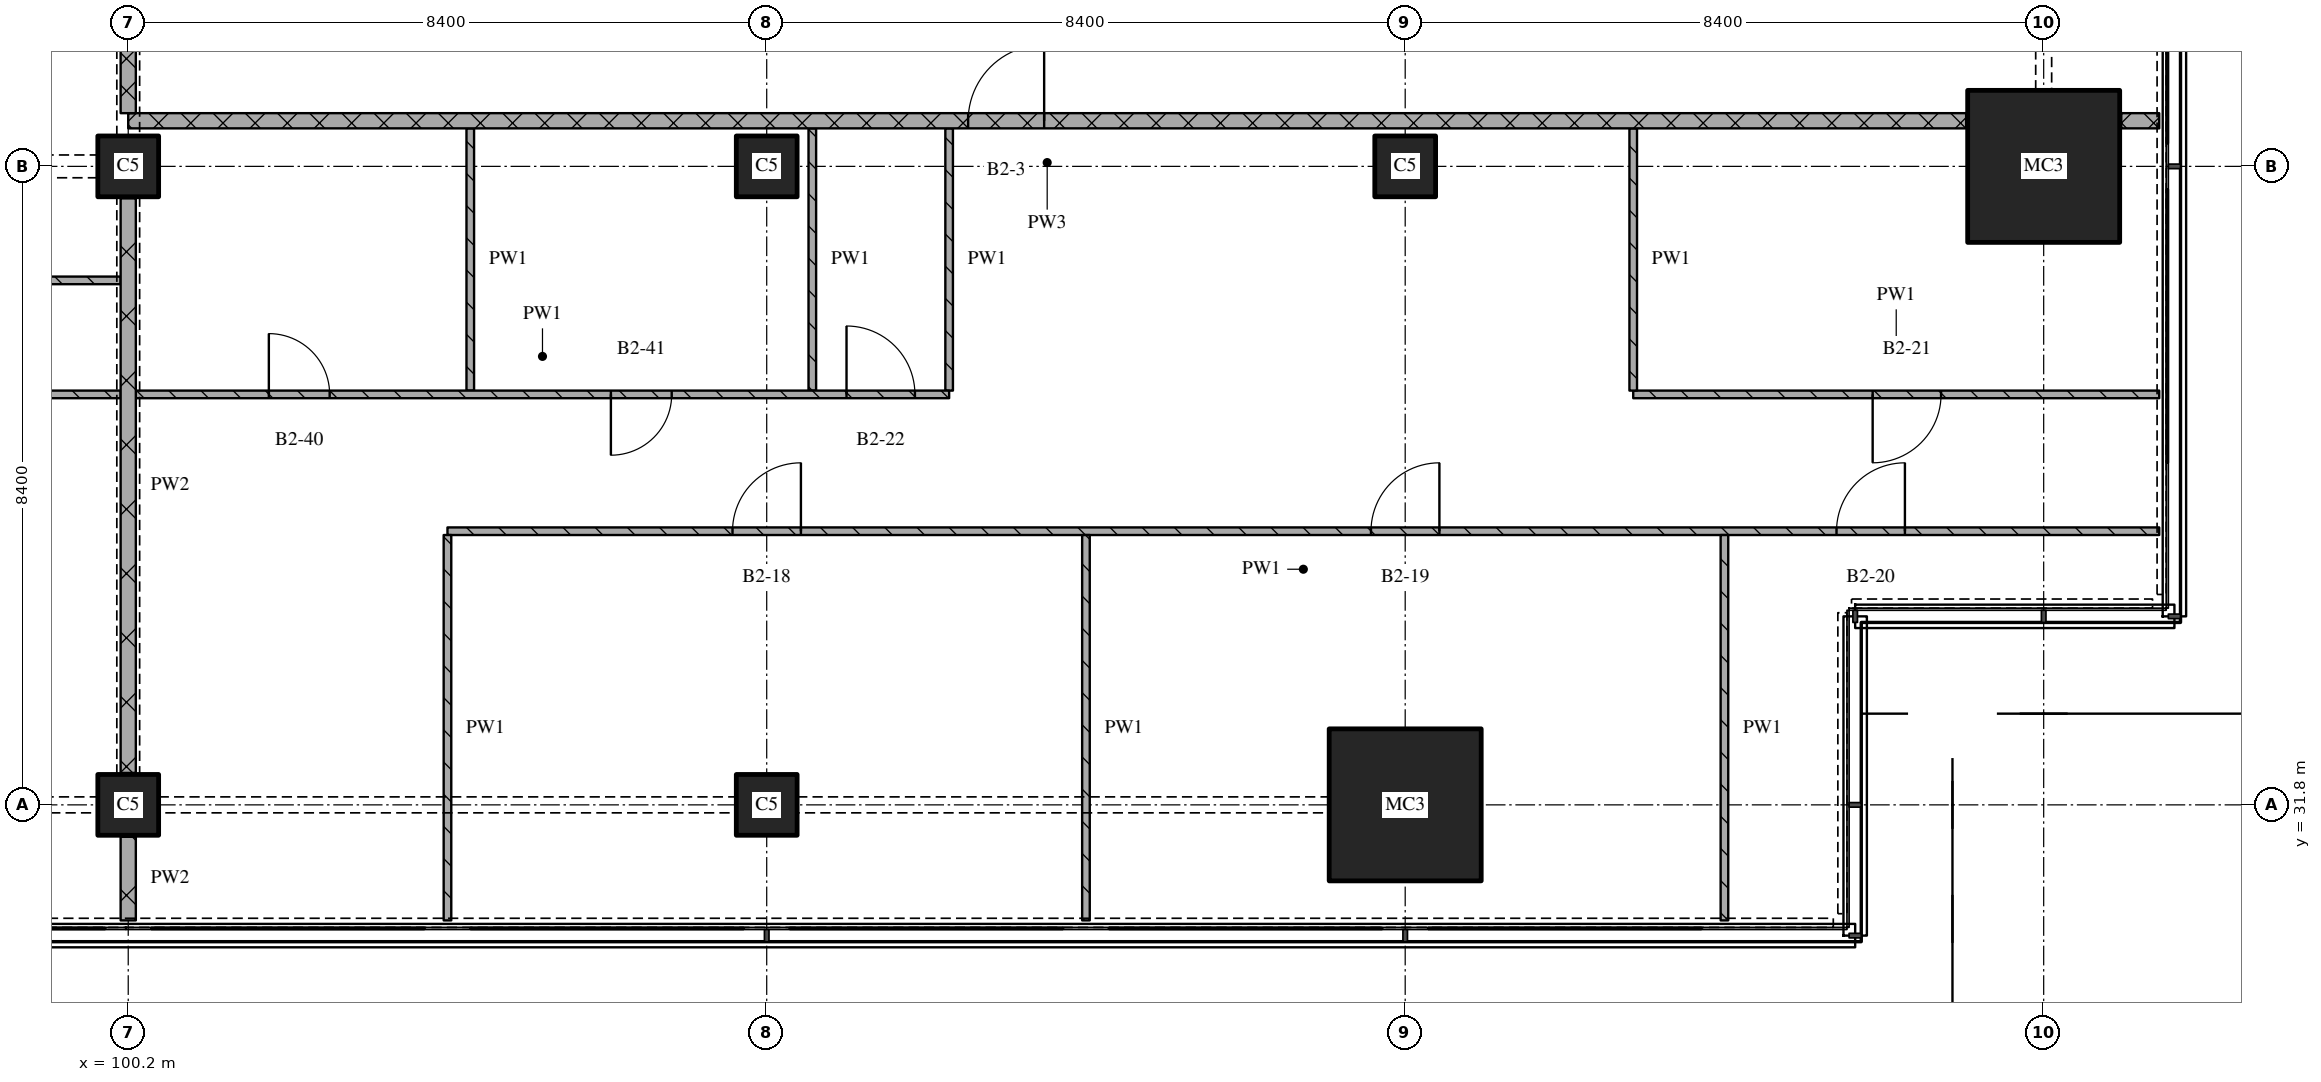
"""IFC4 building model, lengths in metres.
Left out: names, types, materials, properties, quantities, classifications, styles, units other than length and angle.
Written with IfcOpenShell. Run it as: python <this file> out.ifc"""

import sys

from ifc_helpers import new_model, si_unit, direction, frame, frame_2d, origin, origin_2d, place, context, subcontext, project, spatial, rectangle, extrude, element, fill, save


model = new_model("IFC4")
c1 = context("Model", 3, precision=1e-05, world=origin(), true_north=direction((0.0, 1.0)))
c2 = subcontext(c1, "Body", "Model", "MODEL_VIEW")
j1 = project(units=[si_unit("LENGTHUNIT", "METRE"), si_unit("PLANEANGLEUNIT", "RADIAN")], contexts=[c1])
p1 = place(None, origin())
s1 = spatial("IfcSite", under=j1, at=p1, CompositionType="ELEMENT")
p2 = place(p1, origin())
s2 = spatial("IfcBuilding", under=s1, at=p2, CompositionType="ELEMENT")
p3 = place(p2, frame((0.0, 0.0, 106.05)))
s3 = spatial("IfcBuildingStorey", under=s2, at=p3, CompositionType="ELEMENT", Elevation=106.05)
for number, where, z_axis, x_axis in (
    (1, (100.2, 31.8, 0.0), (0.0, 0.0, 1.0), (1.0, 0.0, 0.0)),
    (2, (100.2, 40.2, 0.0), (0.0, 0.0, 1.0), (1.0, 0.0, 0.0)),
    (3, (108.6, 31.8, 0.0), (0.0, 0.0, 1.0), (1.0, 0.0, 0.0)),
    (4, (108.6, 40.2, 0.0), (0.0, 0.0, 1.0), (1.0, 0.0, 0.0)),
):
    element("IfcColumn", number, at=place(p3, frame(where, z_axis=z_axis, x_axis=x_axis)), inside=s3, PredefinedType="COLUMN", context=c2, shape_type="SweptSolid", body=[
        extrude(rectangle(XDim=0.8, YDim=0.8, at=origin_2d()), origin(), (0.0, 0.0, 1.0), 3.6),
    ])
p4 = place(p3, frame((117.0, 31.8, 0.0), z_axis=(0.0, 0.0, 1.0), x_axis=(1.0, 0.0, 0.0)))
e5 = element("IfcColumn", 5, at=p4, inside=s3, PredefinedType="COLUMN", context=c2, shape_type="SweptSolid", body=[
    extrude(rectangle(XDim=2.0, YDim=2.0, at=origin_2d()), origin(), (0.0, 0.0, 1.0), 3.6),
])
p5 = place(p3, frame((117.0, 40.2, 0.0), z_axis=(0.0, 0.0, 1.0), x_axis=(1.0, 0.0, 0.0)))
e6 = element("IfcColumn", 6, at=p5, inside=s3, PredefinedType="COLUMN", context=c2, shape_type="SweptSolid", body=[
    extrude(rectangle(XDim=0.8, YDim=0.8, at=origin_2d()), origin(), (0.0, 0.0, 1.0), 3.6),
])
p6 = place(p3, frame((125.4, 40.2, 0.0), z_axis=(0.0, 0.0, 1.0), x_axis=(1.0, 0.0, 0.0)))
e7 = element("IfcColumn", 7, at=p6, inside=s3, PredefinedType="COLUMN", context=c2, shape_type="SweptSolid", body=[
    extrude(rectangle(XDim=2.0, YDim=2.0, at=origin_2d()), origin(), (0.0, 0.0, 1.0), 3.6),
])
p7 = place(p3, frame((126.92, 35.4, 0.0), z_axis=(0.0, 0.0, 1.0), x_axis=(-1.0, 0.0, 0.0)))
e8 = element("IfcWall", 8, at=p7, inside=s3, PredefinedType="PARTITIONING", context=c2, shape_type="SweptSolid", body=[
    extrude(rectangle(XDim=22.52, YDim=0.1, at=frame_2d((11.26, 0.0))), origin(), (0.0, 0.0, 1.0), 3.32),
])
p8 = place(p7, frame((3.346, 0.0, 0.0)))
e9 = element("IfcOpeningElement", 9, at=p8, cuts=e8, PredefinedType="OPENING", context=c2, shape_type="SweptSolid", body=[
    extrude(rectangle(XDim=0.9, YDim=2.1, at=frame_2d((0.45, 1.05))), frame((0.0, 0.06, 0.0), z_axis=(0.0, -1.0, 0.0), x_axis=(1.0, 0.0, 0.0)), (0.0, 0.0, 1.0), 0.12),
])
p9 = place(p7, frame((9.47, 0.0, 0.0)))
e10 = element("IfcOpeningElement", 10, at=p9, cuts=e8, PredefinedType="OPENING", context=c2, shape_type="SweptSolid", body=[
    extrude(rectangle(XDim=0.9, YDim=2.1, at=frame_2d((0.45, 1.05))), frame((0.0, 0.06, 0.0), z_axis=(0.0, -1.0, 0.0), x_axis=(1.0, 0.0, 0.0)), (0.0, 0.0, 1.0), 0.12),
])
p10 = place(p7, frame((17.87, 0.0, 0.0)))
e11 = element("IfcOpeningElement", 11, at=p10, cuts=e8, PredefinedType="OPENING", context=c2, shape_type="SweptSolid", body=[
    extrude(rectangle(XDim=0.9, YDim=2.1, at=frame_2d((0.45, 1.05))), frame((0.0, 0.06, 0.0), z_axis=(0.0, -1.0, 0.0), x_axis=(1.0, 0.0, 0.0)), (0.0, 0.0, 1.0), 0.12),
])
p11 = place(p3, frame((120.0, 37.2, 0.0), z_axis=(0.0, 0.0, 1.0), x_axis=(1.0, 0.0, 0.0)))
e12 = element("IfcWall", 12, at=p11, inside=s3, PredefinedType="PARTITIONING", context=c2, shape_type="SweptSolid", body=[
    extrude(rectangle(XDim=6.92, YDim=0.1, at=frame_2d((3.46, 0.0))), origin(), (0.0, 0.0, 1.0), 3.32),
])
p12 = place(p11, frame((3.15, 0.0, 0.0)))
e13 = element("IfcOpeningElement", 13, at=p12, cuts=e12, PredefinedType="OPENING", context=c2, shape_type="SweptSolid", body=[
    extrude(rectangle(XDim=0.9, YDim=2.1, at=frame_2d((0.45, 1.05))), frame((0.0, 0.06, 0.0), z_axis=(0.0, -1.0, 0.0), x_axis=(1.0, 0.0, 0.0)), (0.0, 0.0, 1.0), 0.12),
])
p13 = place(p3, frame((95.1, 38.7, 0.0), z_axis=(0.0, 0.0, 1.0), x_axis=(1.0, 0.0, 0.0)))
e14 = element("IfcWall", 14, at=p13, inside=s3, PredefinedType="PARTITIONING", context=c2, shape_type="SweptSolid", body=[
    extrude(rectangle(XDim=5.0, YDim=0.1, at=frame_2d((2.5, 0.0))), origin(), (0.0, 0.0, 1.0), 3.32),
])
p14 = place(p13, frame((2.1, 0.0, 0.0)))
e15 = element("IfcOpeningElement", 15, at=p14, cuts=e14, PredefinedType="OPENING", context=c2, shape_type="SweptSolid", body=[
    extrude(rectangle(XDim=0.9, YDim=2.1, at=frame_2d((0.45, 1.05))), frame((0.0, 0.06, 0.0), z_axis=(0.0, -1.0, 0.0), x_axis=(1.0, 0.0, 0.0)), (0.0, 0.0, 1.0), 0.12),
])
p15 = place(p3, frame((124.38, 40.8, 0.0), z_axis=(0.0, 0.0, 1.0), x_axis=(-1.0, 0.0, 0.0)))
e16 = element("IfcWall", 16, at=p15, inside=s3, PredefinedType="PARTITIONING", context=c2, shape_type="SweptSolid", body=[
    extrude(rectangle(XDim=24.18, YDim=0.2, at=frame_2d((12.09, 0.0))), origin(), (0.0, 0.0, 1.0), 3.32),
])
p16 = place(p15, frame((12.13, 0.0, 0.0)))
e17 = element("IfcOpeningElement", 17, at=p16, cuts=e16, PredefinedType="OPENING", context=c2, shape_type="SweptSolid", body=[
    extrude(rectangle(XDim=1.0, YDim=2.1, at=frame_2d((0.5, 1.05))), frame((0.0, 0.11, 0.0), z_axis=(0.0, -1.0, 0.0), x_axis=(1.0, 0.0, 0.0)), (0.0, 0.0, 1.0), 0.22),
])
p17 = place(p3, frame((126.42, 40.8, 0.0), z_axis=(0.0, 0.0, 1.0), x_axis=(1.0, 0.0, 0.0)))
e18 = element("IfcWall", 18, at=p17, inside=s3, PredefinedType="PARTITIONING", context=c2, shape_type="SweptSolid", body=[
    extrude(rectangle(XDim=0.5, YDim=0.2, at=frame_2d((0.25, 0.0))), origin(), (0.0, 0.0, 1.0), 3.32),
])
p18 = place(p3, frame((100.2, 43.1, 0.0), z_axis=(0.0, 0.0, 1.0), x_axis=(0.0, -1.0, 0.0)))
e19 = element("IfcWall", 19, at=p18, inside=s3, PredefinedType="PARTITIONING", context=c2, shape_type="SweptSolid", body=[
    extrude(rectangle(XDim=2.2, YDim=0.2, at=frame_2d((1.1, 0.0))), origin(), (0.0, 0.0, 1.0), 2.43),
])
p19 = place(p3, frame((100.2, 31.38, 0.0), z_axis=(0.0, 0.0, 1.0), x_axis=(0.0, -1.0, 0.0)))
e20 = element("IfcWall", 20, at=p19, inside=s3, PredefinedType="PARTITIONING", context=c2, shape_type="SweptSolid", body=[
    extrude(rectangle(XDim=1.1, YDim=0.2, at=frame_2d((0.55, 0.0))), origin(), (0.0, 0.0, 1.0), 3.32),
])
p20 = place(p3, frame((100.2, 39.78, 0.0), z_axis=(0.0, 0.0, 1.0), x_axis=(0.0, -1.0, 0.0)))
e21 = element("IfcWall", 21, at=p20, inside=s3, PredefinedType="PARTITIONING", context=c2, shape_type="SweptSolid", body=[
    extrude(rectangle(XDim=7.56, YDim=0.2, at=frame_2d((3.78, 0.0))), origin(), (0.0, 0.0, 1.0), 2.83),
])
p21 = place(p3, frame((104.4, 35.35, 0.0), z_axis=(0.0, 0.0, 1.0), x_axis=(0.0, -1.0, 0.0)))
e22 = element("IfcWall", 22, at=p21, inside=s3, PredefinedType="PARTITIONING", context=c2, shape_type="SweptSolid", body=[
    extrude(rectangle(XDim=5.07, YDim=0.1, at=frame_2d((2.535, 0.0))), origin(), (0.0, 0.0, 1.0), 3.32),
])
for number, where, z_axis, x_axis in (
    (23, (104.7, 40.7, 0.0), (0.0, 0.0, 1.0), (0.0, -1.0, 0.0)),
    (24, (109.2, 40.7, 0.0), (0.0, 0.0, 1.0), (0.0, -1.0, 0.0)),
    (25, (111.0, 40.7, 0.0), (0.0, 0.0, 1.0), (0.0, -1.0, 0.0)),
):
    element("IfcWall", number, at=place(p3, frame(where, z_axis=z_axis, x_axis=x_axis)), inside=s3, PredefinedType="PARTITIONING", context=c2, shape_type="SweptSolid", body=[
        extrude(rectangle(XDim=3.45, YDim=0.1, at=frame_2d((1.725, 0.0))), origin(), (0.0, 0.0, 1.0), 3.32),
    ])
p22 = place(p3, frame((112.8, 35.35, 0.0), z_axis=(0.0, 0.0, 1.0), x_axis=(0.0, -1.0, 0.0)))
e26 = element("IfcWall", 26, at=p22, inside=s3, PredefinedType="PARTITIONING", context=c2, shape_type="SweptSolid", body=[
    extrude(rectangle(XDim=5.07, YDim=0.1, at=frame_2d((2.535, 0.0))), origin(), (0.0, 0.0, 1.0), 3.32),
])
p23 = place(p3, frame((120.0, 40.7, 0.0), z_axis=(0.0, 0.0, 1.0), x_axis=(0.0, -1.0, 0.0)))
e27 = element("IfcWall", 27, at=p23, inside=s3, PredefinedType="PARTITIONING", context=c2, shape_type="SweptSolid", body=[
    extrude(rectangle(XDim=3.45, YDim=0.1, at=frame_2d((1.725, 0.0))), origin(), (0.0, 0.0, 1.0), 3.32),
])
p24 = place(p3, frame((121.2, 35.35, 0.0), z_axis=(0.0, 0.0, 1.0), x_axis=(0.0, -1.0, 0.0)))
e28 = element("IfcWall", 28, at=p24, inside=s3, PredefinedType="PARTITIONING", context=c2, shape_type="SweptSolid", body=[
    extrude(rectangle(XDim=5.07, YDim=0.1, at=frame_2d((2.535, 0.0))), origin(), (0.0, 0.0, 1.0), 3.32),
])
p25 = place(p3, frame((100.1, 37.2, 0.0), z_axis=(0.0, 0.0, 1.0), x_axis=(-1.0, 0.0, 0.0)))
e29 = element("IfcWall", 29, at=p25, inside=s3, PredefinedType="PARTITIONING", context=c2, shape_type="SweptSolid", body=[
    extrude(rectangle(XDim=12.5, YDim=0.1, at=frame_2d((6.25, 0.0))), origin(), (0.0, 0.0, 1.0), 3.32),
])
p26 = place(p25, frame((1.55, 0.0, 0.0)))
e30 = element("IfcOpeningElement", 30, at=p26, cuts=e29, PredefinedType="OPENING", context=c2, shape_type="SweptSolid", body=[
    extrude(rectangle(XDim=0.9, YDim=2.1, at=frame_2d((0.45, 1.05))), frame((0.0, 0.06, 0.0), z_axis=(0.0, -1.0, 0.0), x_axis=(1.0, 0.0, 0.0)), (0.0, 0.0, 1.0), 0.12),
])
p27 = place(p25, frame((7.85, 0.0, 0.0)))
e31 = element("IfcOpeningElement", 31, at=p27, cuts=e29, PredefinedType="OPENING", context=c2, shape_type="SweptSolid", body=[
    extrude(rectangle(XDim=0.9, YDim=2.1, at=frame_2d((0.45, 1.05))), frame((0.0, 0.06, 0.0), z_axis=(0.0, -1.0, 0.0), x_axis=(1.0, 0.0, 0.0)), (0.0, 0.0, 1.0), 0.12),
])
p28 = place(p3, frame((100.3, 37.2, 0.0), z_axis=(0.0, 0.0, 1.0), x_axis=(1.0, 0.0, 0.0)))
e32 = element("IfcWall", 32, at=p28, inside=s3, PredefinedType="PARTITIONING", context=c2, shape_type="SweptSolid", body=[
    extrude(rectangle(XDim=10.7, YDim=0.1, at=frame_2d((5.35, 0.0))), origin(), (0.0, 0.0, 1.0), 3.32),
])
p29 = place(p28, frame((1.75, 0.0, 0.0)))
e33 = element("IfcOpeningElement", 33, at=p29, cuts=e32, PredefinedType="OPENING", context=c2, shape_type="SweptSolid", body=[
    extrude(rectangle(XDim=0.8, YDim=2.1, at=frame_2d((0.4, 1.05))), frame((0.0, 0.06, 0.0), z_axis=(0.0, -1.0, 0.0), x_axis=(1.0, 0.0, 0.0)), (0.0, 0.0, 1.0), 0.12),
])
p30 = place(p28, frame((6.25, 0.0, 0.0)))
e34 = element("IfcOpeningElement", 34, at=p30, cuts=e32, PredefinedType="OPENING", context=c2, shape_type="SweptSolid", body=[
    extrude(rectangle(XDim=0.8, YDim=2.1, at=frame_2d((0.4, 1.05))), frame((0.0, 0.06, 0.0), z_axis=(0.0, -1.0, 0.0), x_axis=(1.0, 0.0, 0.0)), (0.0, 0.0, 1.0), 0.12),
])
p31 = place(p28, frame((9.35, 0.0, 0.0)))
e35 = element("IfcOpeningElement", 35, at=p31, cuts=e32, PredefinedType="OPENING", context=c2, shape_type="SweptSolid", body=[
    extrude(rectangle(XDim=0.9, YDim=2.1, at=frame_2d((0.45, 1.05))), frame((0.0, 0.06, 0.0), z_axis=(0.0, -1.0, 0.0), x_axis=(1.0, 0.0, 0.0)), (0.0, 0.0, 1.0), 0.12),
])
p32 = place(p8, origin())
e36 = element("IfcDoor", 36, at=p32, inside=s3, OperationType="SINGLE_SWING_RIGHT", PredefinedType="DOOR", context=c2, shape_type="SweptSolid", body=[
    extrude(rectangle(XDim=0.9, YDim=2.1, at=frame_2d((0.45, 1.05))), frame((0.0, 0.025, 0.0), z_axis=(0.0, -1.0, 0.0), x_axis=(1.0, 0.0, 0.0)), (0.0, 0.0, 1.0), 0.05),
])
fill(e9, e36)
p33 = place(p9, origin())
e37 = element("IfcDoor", 37, at=p33, inside=s3, OperationType="SINGLE_SWING_RIGHT", PredefinedType="DOOR", context=c2, shape_type="SweptSolid", body=[
    extrude(rectangle(XDim=0.9, YDim=2.1, at=frame_2d((0.45, 1.05))), frame((0.0, 0.025, 0.0), z_axis=(0.0, -1.0, 0.0), x_axis=(1.0, 0.0, 0.0)), (0.0, 0.0, 1.0), 0.05),
])
fill(e10, e37)
p34 = place(p10, origin())
e38 = element("IfcDoor", 38, at=p34, inside=s3, OperationType="SINGLE_SWING_RIGHT", PredefinedType="DOOR", context=c2, shape_type="SweptSolid", body=[
    extrude(rectangle(XDim=0.9, YDim=2.1, at=frame_2d((0.45, 1.05))), frame((0.0, 0.025, 0.0), z_axis=(0.0, -1.0, 0.0), x_axis=(1.0, 0.0, 0.0)), (0.0, 0.0, 1.0), 0.05),
])
fill(e11, e38)
p35 = place(p12, origin())
e39 = element("IfcDoor", 39, at=p35, inside=s3, OperationType="SINGLE_SWING_RIGHT", PredefinedType="DOOR", context=c2, shape_type="SweptSolid", body=[
    extrude(rectangle(XDim=0.9, YDim=2.1, at=frame_2d((0.45, 1.05))), frame((0.0, 0.025, 0.0), z_axis=(0.0, -1.0, 0.0), x_axis=(1.0, 0.0, 0.0)), (0.0, 0.0, 1.0), 0.05),
])
fill(e13, e39)
p36 = place(p16, origin())
e40 = element("IfcDoor", 40, at=p36, inside=s3, OperationType="SINGLE_SWING_RIGHT", PredefinedType="DOOR", context=c2, shape_type="SweptSolid", body=[
    extrude(rectangle(XDim=1.0, YDim=2.1, at=frame_2d((0.5, 1.05))), frame((0.0, 0.025, 0.0), z_axis=(0.0, -1.0, 0.0), x_axis=(1.0, 0.0, 0.0)), (0.0, 0.0, 1.0), 0.05),
])
fill(e17, e40)
p37 = place(p29, origin())
e41 = element("IfcDoor", 41, at=p37, inside=s3, OperationType="SINGLE_SWING_LEFT", PredefinedType="DOOR", context=c2, shape_type="SweptSolid", body=[
    extrude(rectangle(XDim=0.8, YDim=2.1, at=frame_2d((0.4, 1.05))), frame((0.0, 0.025, 0.0), z_axis=(0.0, -1.0, 0.0), x_axis=(1.0, 0.0, 0.0)), (0.0, 0.0, 1.0), 0.05),
])
fill(e33, e41)
p38 = place(p30, origin())
e42 = element("IfcDoor", 42, at=p38, inside=s3, OperationType="SINGLE_SWING_RIGHT", PredefinedType="DOOR", context=c2, shape_type="SweptSolid", body=[
    extrude(rectangle(XDim=0.8, YDim=2.1, at=frame_2d((0.4, 1.05))), frame((0.0, 0.025, 0.0), z_axis=(0.0, -1.0, 0.0), x_axis=(1.0, 0.0, 0.0)), (0.0, 0.0, 1.0), 0.05),
])
fill(e34, e42)
p39 = place(p31, origin())
e43 = element("IfcDoor", 43, at=p39, inside=s3, OperationType="SINGLE_SWING_LEFT", PredefinedType="DOOR", context=c2, shape_type="SweptSolid", body=[
    extrude(rectangle(XDim=0.9, YDim=2.1, at=frame_2d((0.45, 1.05))), frame((0.0, 0.025, 0.0), z_axis=(0.0, -1.0, 0.0), x_axis=(1.0, 0.0, 0.0)), (0.0, 0.0, 1.0), 0.05),
])
fill(e35, e43)
save(model, sys.argv[1])
